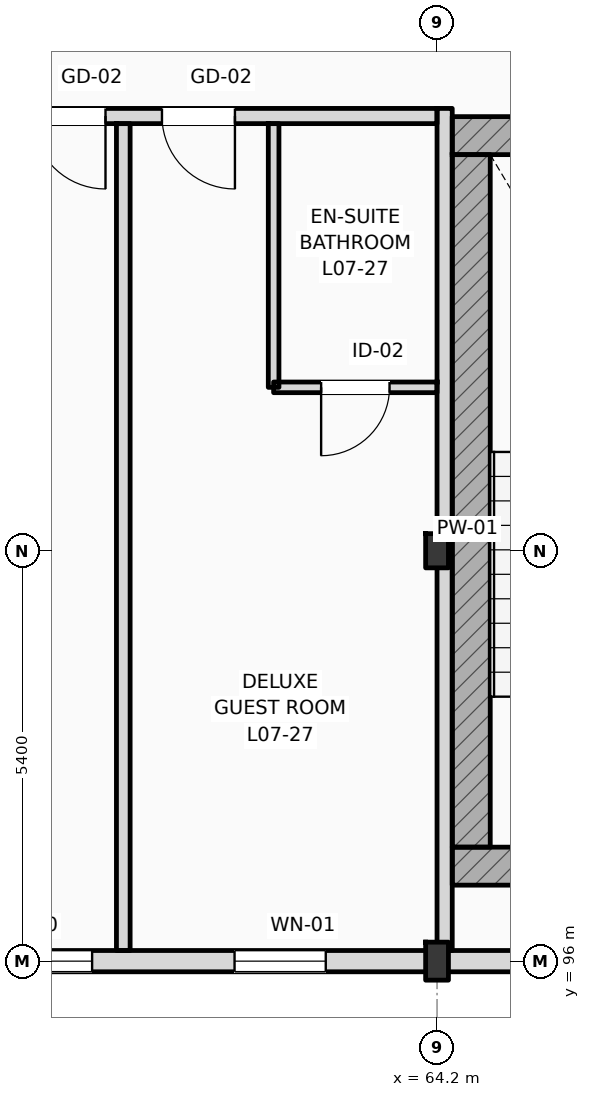
"""IFC4 building model, lengths in metres.
Left out: names, types, materials, properties, quantities, classifications, styles, units other than length and angle.
Written with IfcOpenShell. Run it as: python <this file> out.ifc"""

import sys

from ifc_helpers import new_model, si_unit, direction, frame, frame_2d, origin, origin_2d, place, context, subcontext, project, spatial, rectangle, i_section, extrude, element, fill, save


model = new_model("IFC4")
c1 = context("Model", 3, precision=1e-05, world=origin(), true_north=direction((0.0, 1.0)))
c2 = subcontext(c1, "Body", "Model", "MODEL_VIEW")
j1 = project(units=[si_unit("LENGTHUNIT", "METRE"), si_unit("PLANEANGLEUNIT", "RADIAN")], contexts=[c1])
p1 = place(None, origin())
s1 = spatial("IfcSite", under=j1, at=p1, CompositionType="ELEMENT")
p2 = place(p1, origin())
s2 = spatial("IfcBuilding", under=s1, at=p2, CompositionType="ELEMENT")
p3 = place(p2, frame((0.0, 0.0, 31.8)))
s3 = spatial("IfcBuildingStorey", under=s2, at=p3, CompositionType="ELEMENT", Elevation=31.8)
p4 = place(p3, frame((64.2, 96.0, 0.0), z_axis=(0.0, 0.0, 1.0), x_axis=(1.0, 0.0, 0.0)))
e1 = element("IfcColumn", 1, at=p4, inside=s3, PredefinedType="COLUMN", context=c2, shape_type="SweptSolid", body=[
    extrude(i_section(OverallWidth=0.3, OverallDepth=0.5, WebThickness=0.014, FlangeThickness=0.028, FilletRadius=0.027, at=origin_2d()), origin(), (0.0, 0.0, 1.0), 3.6),
])
p5 = place(p3, frame((64.2, 101.4, 0.0), z_axis=(0.0, 0.0, 1.0), x_axis=(1.0, 0.0, 0.0)))
e2 = element("IfcColumn", 2, at=p5, inside=s3, PredefinedType="COLUMN", context=c2, shape_type="SweptSolid", body=[
    extrude(i_section(OverallWidth=0.3, OverallDepth=0.45, WebThickness=0.014, FlangeThickness=0.026, FilletRadius=0.027, at=origin_2d()), origin(), (0.0, 0.0, 1.0), 3.6),
])
for number, where, z_axis, x_axis in (
    (3, (64.4, 106.862, 0.0), (0.0, 0.0, 1.0), (1.0, 0.0, 0.0)),
    (4, (64.4, 97.25, 0.0), (0.0, 0.0, 1.0), (1.0, 0.0, 0.0)),
):
    element("IfcWall", number, at=place(p3, frame(where, z_axis=z_axis, x_axis=x_axis)), inside=s3, PredefinedType="SHEAR", context=c2, shape_type="SweptSolid", body=[
        extrude(rectangle(XDim=5.16, YDim=0.5, at=frame_2d((2.58, 0.0))), origin(), (0.0, 0.0, 1.0), 3.6),
    ])
p6 = place(p3, frame((64.65, 97.5, 0.0), z_axis=(0.0, 0.0, 1.0), x_axis=(0.0, 1.0, 0.0)))
e5 = element("IfcWall", 5, at=p6, inside=s3, PredefinedType="SHEAR", context=c2, shape_type="SweptSolid", body=[
    extrude(rectangle(XDim=9.112, YDim=0.5, at=frame_2d((4.556, 0.0))), origin(), (0.0, 0.0, 1.0), 3.6),
])
p7 = place(p3, frame((25.2, 96.0, 0.0), z_axis=(0.0, 0.0, 1.0), x_axis=(1.0, 0.0, 0.0)))
e6 = element("IfcWall", 6, at=p7, inside=s3, PredefinedType="STANDARD", context=c2, shape_type="SweptSolid", body=[
    extrude(rectangle(XDim=94.8, YDim=0.28, at=frame_2d((47.4, 0.0))), origin(), (0.0, 0.0, 1.0), 2.72),
])
p8 = place(p7, frame((16.394, 0.0, 0.9)))
e7 = element("IfcOpeningElement", 7, at=p8, cuts=e6, PredefinedType="OPENING", context=c2, shape_type="SweptSolid", body=[
    extrude(rectangle(XDim=2.0, YDim=1.64, at=frame_2d((1.0, 0.82))), frame((0.0, 0.15, 0.0), z_axis=(0.0, -1.0, 0.0), x_axis=(1.0, 0.0, 0.0)), (0.0, 0.0, 1.0), 0.3),
])
p9 = place(p7, frame((20.207, 0.0, 0.9)))
e8 = element("IfcOpeningElement", 8, at=p9, cuts=e6, PredefinedType="OPENING", context=c2, shape_type="SweptSolid", body=[
    extrude(rectangle(XDim=2.3, YDim=1.64, at=frame_2d((1.15, 0.82))), frame((0.0, 0.15, 0.0), z_axis=(0.0, -1.0, 0.0), x_axis=(1.0, 0.0, 0.0)), (0.0, 0.0, 1.0), 0.3),
])
p10 = place(p7, frame((24.287, 0.0, 0.9)))
e9 = element("IfcOpeningElement", 9, at=p10, cuts=e6, PredefinedType="OPENING", context=c2, shape_type="SweptSolid", body=[
    extrude(rectangle(XDim=2.358, YDim=1.64, at=frame_2d((1.179, 0.82))), frame((0.0, 0.15, 0.0), z_axis=(0.0, -1.0, 0.0), x_axis=(1.0, 0.0, 0.0)), (0.0, 0.0, 1.0), 0.3),
])
p11 = place(p7, frame((27.665, 0.0, 0.9)))
e10 = element("IfcOpeningElement", 10, at=p11, cuts=e6, PredefinedType="OPENING", context=c2, shape_type="SweptSolid", body=[
    extrude(rectangle(XDim=1.8, YDim=1.64, at=frame_2d((0.9, 0.82))), frame((0.0, 0.15, 0.0), z_axis=(0.0, -1.0, 0.0), x_axis=(1.0, 0.0, 0.0)), (0.0, 0.0, 1.0), 0.3),
])
p12 = place(p7, frame((32.103, 0.0, 0.9)))
e11 = element("IfcOpeningElement", 11, at=p12, cuts=e6, PredefinedType="OPENING", context=c2, shape_type="SweptSolid", body=[
    extrude(rectangle(XDim=2.359, YDim=1.64, at=frame_2d((1.179, 0.82))), frame((0.0, 0.15, 0.0), z_axis=(0.0, -1.0, 0.0), x_axis=(1.0, 0.0, 0.0)), (0.0, 0.0, 1.0), 0.3),
])
p13 = place(p7, frame((36.336, 0.0, 0.9)))
e12 = element("IfcOpeningElement", 12, at=p13, cuts=e6, PredefinedType="OPENING", context=c2, shape_type="SweptSolid", body=[
    extrude(rectangle(XDim=1.2, YDim=1.64, at=frame_2d((0.6, 0.82))), frame((0.0, 0.15, 0.0), z_axis=(0.0, -1.0, 0.0), x_axis=(1.0, 0.0, 0.0)), (0.0, 0.0, 1.0), 0.3),
])
p14 = place(p7, frame((56.177, 0.0, 0.9)))
e13 = element("IfcOpeningElement", 13, at=p14, cuts=e6, PredefinedType="OPENING", context=c2, shape_type="SweptSolid", body=[
    extrude(rectangle(XDim=1.35, YDim=1.64, at=frame_2d((0.675, 0.82))), frame((0.0, 0.15, 0.0), z_axis=(0.0, -1.0, 0.0), x_axis=(1.0, 0.0, 0.0)), (0.0, 0.0, 1.0), 0.3),
])
p15 = place(p7, frame((60.086, 0.0, 0.9)))
e14 = element("IfcOpeningElement", 14, at=p15, cuts=e6, PredefinedType="OPENING", context=c2, shape_type="SweptSolid", body=[
    extrude(rectangle(XDim=1.5, YDim=1.64, at=frame_2d((0.75, 0.82))), frame((0.0, 0.15, 0.0), z_axis=(0.0, -1.0, 0.0), x_axis=(1.0, 0.0, 0.0)), (0.0, 0.0, 1.0), 0.3),
])
p16 = place(p7, frame((64.838, 0.0, 0.9)))
e15 = element("IfcOpeningElement", 15, at=p16, cuts=e6, PredefinedType="OPENING", context=c2, shape_type="SweptSolid", body=[
    extrude(rectangle(XDim=1.65, YDim=1.64, at=frame_2d((0.825, 0.82))), frame((0.0, 0.15, 0.0), z_axis=(0.0, -1.0, 0.0), x_axis=(1.0, 0.0, 0.0)), (0.0, 0.0, 1.0), 0.3),
])
p17 = place(p7, frame((68.419, 0.0, 0.9)))
e16 = element("IfcOpeningElement", 16, at=p17, cuts=e6, PredefinedType="OPENING", context=c2, shape_type="SweptSolid", body=[
    extrude(rectangle(XDim=0.9, YDim=1.64, at=frame_2d((0.45, 0.82))), frame((0.0, 0.15, 0.0), z_axis=(0.0, -1.0, 0.0), x_axis=(1.0, 0.0, 0.0)), (0.0, 0.0, 1.0), 0.3),
])
p18 = place(p7, frame((73.544, 0.0, 0.9)))
e17 = element("IfcOpeningElement", 17, at=p18, cuts=e6, PredefinedType="OPENING", context=c2, shape_type="SweptSolid", body=[
    extrude(rectangle(XDim=1.95, YDim=1.64, at=frame_2d((0.975, 0.82))), frame((0.0, 0.15, 0.0), z_axis=(0.0, -1.0, 0.0), x_axis=(1.0, 0.0, 0.0)), (0.0, 0.0, 1.0), 0.3),
])
p19 = place(p7, frame((78.897, 0.0, 0.9)))
e18 = element("IfcOpeningElement", 18, at=p19, cuts=e6, PredefinedType="OPENING", context=c2, shape_type="SweptSolid", body=[
    extrude(rectangle(XDim=1.35, YDim=1.64, at=frame_2d((0.675, 0.82))), frame((0.0, 0.15, 0.0), z_axis=(0.0, -1.0, 0.0), x_axis=(1.0, 0.0, 0.0)), (0.0, 0.0, 1.0), 0.3),
])
p20 = place(p7, frame((82.249, 0.0, 0.9)))
e19 = element("IfcOpeningElement", 19, at=p20, cuts=e6, PredefinedType="OPENING", context=c2, shape_type="SweptSolid", body=[
    extrude(rectangle(XDim=2.25, YDim=1.64, at=frame_2d((1.125, 0.82))), frame((0.0, 0.15, 0.0), z_axis=(0.0, -1.0, 0.0), x_axis=(1.0, 0.0, 0.0)), (0.0, 0.0, 1.0), 0.3),
])
p21 = place(p7, frame((87.202, 0.0, 0.9)))
e20 = element("IfcOpeningElement", 20, at=p21, cuts=e6, PredefinedType="OPENING", context=c2, shape_type="SweptSolid", body=[
    extrude(rectangle(XDim=1.8, YDim=1.64, at=frame_2d((0.9, 0.82))), frame((0.0, 0.15, 0.0), z_axis=(0.0, -1.0, 0.0), x_axis=(1.0, 0.0, 0.0)), (0.0, 0.0, 1.0), 0.3),
])
p22 = place(p7, frame((90.867, 0.0, 0.9)))
e21 = element("IfcOpeningElement", 21, at=p22, cuts=e6, PredefinedType="OPENING", context=c2, shape_type="SweptSolid", body=[
    extrude(rectangle(XDim=2.55, YDim=1.64, at=frame_2d((1.275, 0.82))), frame((0.0, 0.15, 0.0), z_axis=(0.0, -1.0, 0.0), x_axis=(1.0, 0.0, 0.0)), (0.0, 0.0, 1.0), 0.3),
])
p23 = place(p3, frame((40.76, 107.12, 0.0), z_axis=(0.0, 0.0, 1.0), x_axis=(1.0, 0.0, 0.0)))
e22 = element("IfcWall", 22, at=p23, inside=s3, PredefinedType="PARTITIONING", context=c2, shape_type="SweptSolid", body=[
    extrude(rectangle(XDim=23.44, YDim=0.2, at=frame_2d((11.72, 0.0))), origin(), (0.0, 0.0, 1.0), 3.36),
])
p24 = place(p23, frame((2.429, 0.0, 0.0)))
e23 = element("IfcOpeningElement", 23, at=p24, cuts=e22, PredefinedType="OPENING", context=c2, shape_type="SweptSolid", body=[
    extrude(rectangle(XDim=0.96, YDim=2.2, at=frame_2d((0.48, 1.1))), frame((0.0, 0.11, 0.0), z_axis=(0.0, -1.0, 0.0), x_axis=(1.0, 0.0, 0.0)), (0.0, 0.0, 1.0), 0.22),
])
p25 = place(p23, frame((4.243, 0.0, 0.0)))
e24 = element("IfcOpeningElement", 24, at=p25, cuts=e22, PredefinedType="OPENING", context=c2, shape_type="SweptSolid", body=[
    extrude(rectangle(XDim=0.96, YDim=2.2, at=frame_2d((0.48, 1.1))), frame((0.0, 0.11, 0.0), z_axis=(0.0, -1.0, 0.0), x_axis=(1.0, 0.0, 0.0)), (0.0, 0.0, 1.0), 0.22),
])
p26 = place(p23, frame((10.301, 0.0, 0.0)))
e25 = element("IfcOpeningElement", 25, at=p26, cuts=e22, PredefinedType="OPENING", context=c2, shape_type="SweptSolid", body=[
    extrude(rectangle(XDim=0.96, YDim=2.2, at=frame_2d((0.48, 1.1))), frame((0.0, 0.11, 0.0), z_axis=(0.0, -1.0, 0.0), x_axis=(1.0, 0.0, 0.0)), (0.0, 0.0, 1.0), 0.22),
])
p27 = place(p23, frame((12.059, 0.0, 0.0)))
e26 = element("IfcOpeningElement", 26, at=p27, cuts=e22, PredefinedType="OPENING", context=c2, shape_type="SweptSolid", body=[
    extrude(rectangle(XDim=0.96, YDim=2.2, at=frame_2d((0.48, 1.1))), frame((0.0, 0.11, 0.0), z_axis=(0.0, -1.0, 0.0), x_axis=(1.0, 0.0, 0.0)), (0.0, 0.0, 1.0), 0.22),
])
p28 = place(p23, frame((18.118, 0.0, 0.0)))
e27 = element("IfcOpeningElement", 27, at=p28, cuts=e22, PredefinedType="OPENING", context=c2, shape_type="SweptSolid", body=[
    extrude(rectangle(XDim=0.96, YDim=2.2, at=frame_2d((0.48, 1.1))), frame((0.0, 0.11, 0.0), z_axis=(0.0, -1.0, 0.0), x_axis=(1.0, 0.0, 0.0)), (0.0, 0.0, 1.0), 0.22),
])
p29 = place(p23, frame((19.821, 0.0, 0.0)))
e28 = element("IfcOpeningElement", 28, at=p29, cuts=e22, PredefinedType="OPENING", context=c2, shape_type="SweptSolid", body=[
    extrude(rectangle(XDim=0.96, YDim=2.2, at=frame_2d((0.48, 1.1))), frame((0.0, 0.11, 0.0), z_axis=(0.0, -1.0, 0.0), x_axis=(1.0, 0.0, 0.0)), (0.0, 0.0, 1.0), 0.22),
])
p30 = place(p3, frame((64.3, 96.14, 0.0), z_axis=(0.0, 0.0, 1.0), x_axis=(0.0, 1.0, 0.0)))
e29 = element("IfcWall", 29, at=p30, inside=s3, PredefinedType="PARTITIONING", context=c2, shape_type="SweptSolid", body=[
    extrude(rectangle(XDim=11.08, YDim=0.2, at=frame_2d((5.54, 0.0))), origin(), (0.0, 0.0, 1.0), 2.99),
])
p31 = place(p3, frame((60.072, 96.14, 0.0), z_axis=(0.0, 0.0, 1.0), x_axis=(0.0, 1.0, 0.0)))
e30 = element("IfcWall", 30, at=p31, inside=s3, PredefinedType="PARTITIONING", context=c2, shape_type="SweptSolid", body=[
    extrude(rectangle(XDim=10.88, YDim=0.18, at=frame_2d((5.44, 0.0))), origin(), (0.0, 0.0, 1.0), 3.36),
])
p32 = place(p3, frame((62.05, 103.55, 0.0), z_axis=(0.0, 0.0, 1.0), x_axis=(0.0, 1.0, 0.0)))
e31 = element("IfcWall", 31, at=p32, inside=s3, PredefinedType="PARTITIONING", context=c2, shape_type="SweptSolid", body=[
    extrude(rectangle(XDim=3.47, YDim=0.14, at=frame_2d((1.735, 0.0))), origin(), (0.0, 0.0, 1.0), 3.36),
])
p33 = place(p3, frame((62.05, 103.55, 0.0), z_axis=(0.0, 0.0, 1.0), x_axis=(1.0, 0.0, 0.0)))
e32 = element("IfcWall", 32, at=p33, inside=s3, PredefinedType="PARTITIONING", context=c2, shape_type="SweptSolid", body=[
    extrude(rectangle(XDim=2.15, YDim=0.14, at=frame_2d((1.075, 0.0))), origin(), (0.0, 0.0, 1.0), 3.36),
])
p34 = place(p33, frame((0.625, 0.0, 0.0)))
e33 = element("IfcOpeningElement", 33, at=p34, cuts=e32, PredefinedType="OPENING", context=c2, shape_type="SweptSolid", body=[
    extrude(rectangle(XDim=0.9, YDim=2.1, at=frame_2d((0.45, 1.05))), frame((0.0, 0.08, 0.0), z_axis=(0.0, -1.0, 0.0), x_axis=(1.0, 0.0, 0.0)), (0.0, 0.0, 1.0), 0.16),
])
p35 = place(p12, origin())
e34 = element("IfcWindow", 34, at=p35, inside=s3, PartitioningType="DOUBLE_PANEL_VERTICAL", PredefinedType="WINDOW", context=c2, shape_type="SweptSolid", body=[
    extrude(rectangle(XDim=2.359, YDim=1.64, at=frame_2d((1.179, 0.82))), frame((0.0, 0.03, 0.0), z_axis=(0.0, -1.0, 0.0), x_axis=(1.0, 0.0, 0.0)), (0.0, 0.0, 1.0), 0.06),
])
fill(e11, e34)
p36 = place(p13, origin())
e35 = element("IfcWindow", 35, at=p36, inside=s3, PartitioningType="DOUBLE_PANEL_VERTICAL", PredefinedType="WINDOW", context=c2, shape_type="SweptSolid", body=[
    extrude(rectangle(XDim=1.2, YDim=1.64, at=frame_2d((0.6, 0.82))), frame((0.0, 0.03, 0.0), z_axis=(0.0, -1.0, 0.0), x_axis=(1.0, 0.0, 0.0)), (0.0, 0.0, 1.0), 0.06),
])
fill(e12, e35)
p37 = place(p28, frame((0.96, 0.0, 0.0), z_axis=(0.0, 0.0, 1.0), x_axis=(-1.0, 0.0, 0.0)))
e36 = element("IfcDoor", 36, at=p37, inside=s3, OperationType="SINGLE_SWING_RIGHT", PredefinedType="DOOR", context=c2, shape_type="SweptSolid", body=[
    extrude(rectangle(XDim=0.96, YDim=2.2, at=frame_2d((0.48, 1.1))), frame((0.0, 0.025, 0.0), z_axis=(0.0, -1.0, 0.0), x_axis=(1.0, 0.0, 0.0)), (0.0, 0.0, 1.0), 0.05),
])
fill(e27, e36)
p38 = place(p29, frame((0.96, 0.0, 0.0), z_axis=(0.0, 0.0, 1.0), x_axis=(-1.0, 0.0, 0.0)))
e37 = element("IfcDoor", 37, at=p38, inside=s3, OperationType="SINGLE_SWING_RIGHT", PredefinedType="DOOR", context=c2, shape_type="SweptSolid", body=[
    extrude(rectangle(XDim=0.96, YDim=2.2, at=frame_2d((0.48, 1.1))), frame((0.0, 0.025, 0.0), z_axis=(0.0, -1.0, 0.0), x_axis=(1.0, 0.0, 0.0)), (0.0, 0.0, 1.0), 0.05),
])
fill(e28, e37)
p39 = place(p34, frame((0.9, 0.0, 0.0), z_axis=(0.0, 0.0, 1.0), x_axis=(-1.0, 0.0, 0.0)))
e38 = element("IfcDoor", 38, at=p39, inside=s3, OperationType="SINGLE_SWING_LEFT", PredefinedType="DOOR", context=c2, shape_type="SweptSolid", body=[
    extrude(rectangle(XDim=0.9, YDim=2.1, at=frame_2d((0.45, 1.05))), frame((0.0, 0.025, 0.0), z_axis=(0.0, -1.0, 0.0), x_axis=(1.0, 0.0, 0.0)), (0.0, 0.0, 1.0), 0.05),
])
fill(e33, e38)
save(model, sys.argv[1])
